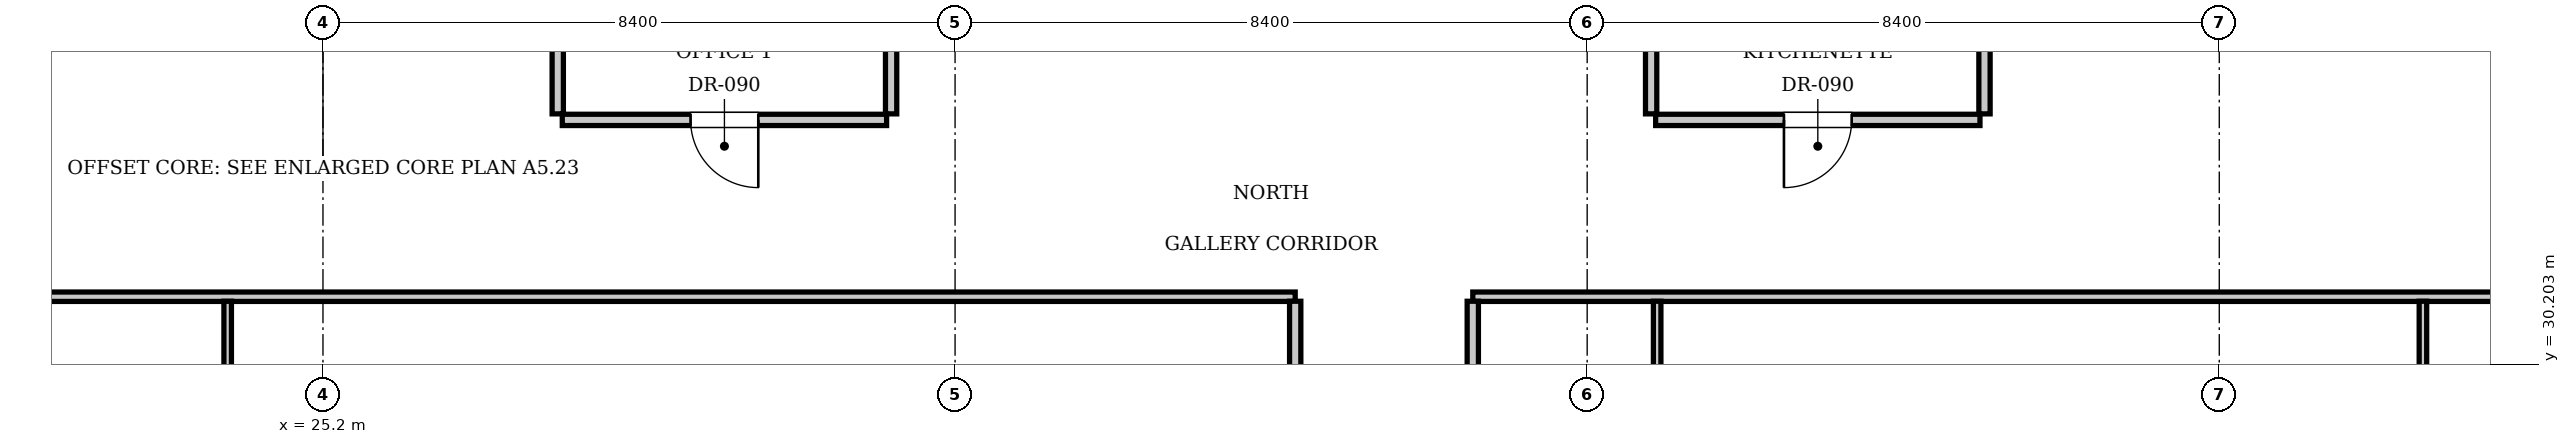
"""IFC4 building model, lengths in metres.
Left out: names, types, materials, properties, quantities, classifications, styles, units other than length and angle.
Written with IfcOpenShell. Run it as: python <this file> out.ifc"""

import sys

from ifc_helpers import new_model, si_unit, direction, frame, frame_2d, origin, place, context, subcontext, project, spatial, rectangle, extrude, element, fill, save


model = new_model("IFC4")
c1 = context("Model", 3, precision=1e-05, world=origin(), true_north=direction((0.0, 1.0)))
c2 = subcontext(c1, "Body", "Model", "MODEL_VIEW")
j1 = project(units=[si_unit("LENGTHUNIT", "METRE"), si_unit("PLANEANGLEUNIT", "RADIAN")], contexts=[c1])
p1 = place(None, origin())
s1 = spatial("IfcSite", under=j1, at=p1, CompositionType="ELEMENT")
p2 = place(p1, origin())
s2 = spatial("IfcBuilding", under=s1, at=p2, CompositionType="ELEMENT")
p3 = place(p2, frame((0.0, 0.0, 150.5)))
s3 = spatial("IfcBuildingStorey", under=s2, at=p3, CompositionType="ELEMENT", Elevation=150.5)
for number, where, z_axis, x_axis in (
    (1, (28.32, 33.53, 0.0), (0.0, 0.0, 1.0), (0.0, 1.0, 0.0)),
    (2, (32.75, 33.53, 0.0), (0.0, 0.0, 1.0), (0.0, 1.0, 0.0)),
):
    element("IfcWall", number, at=place(p3, frame(where, z_axis=z_axis, x_axis=x_axis)), inside=s3, PredefinedType="PARTITIONING", context=c2, shape_type="SweptSolid", body=[
        extrude(rectangle(XDim=2.59, YDim=0.15, at=frame_2d((1.295, 0.0))), origin(), (0.0, 0.0, 1.0), 3.61),
    ])
p4 = place(p3, frame((28.38, 33.45, 0.0), z_axis=(0.0, 0.0, 1.0), x_axis=(1.0, 0.0, 0.0)))
e3 = element("IfcWall", 3, at=p4, inside=s3, PredefinedType="PARTITIONING", context=c2, shape_type="SweptSolid", body=[
    extrude(rectangle(XDim=4.31, YDim=0.15, at=frame_2d((2.155, 0.0))), origin(), (0.0, 0.0, 1.0), 3.61),
])
p5 = place(p4, frame((1.705, 0.0, 0.0)))
e4 = element("IfcOpeningElement", 4, at=p5, cuts=e3, PredefinedType="OPENING", context=c2, shape_type="SweptSolid", body=[
    extrude(rectangle(XDim=0.9, YDim=2.1, at=frame_2d((0.45, 1.05))), frame((0.0, 0.085, 0.0), z_axis=(0.0, -1.0, 0.0), x_axis=(1.0, 0.0, 0.0)), (0.0, 0.0, 1.0), 0.17),
])
for number, where, z_axis, x_axis in (
    (5, (42.85, 33.53, 0.0), (0.0, 0.0, 1.0), (0.0, 1.0, 0.0)),
    (6, (47.28, 33.53, 0.0), (0.0, 0.0, 1.0), (0.0, 1.0, 0.0)),
):
    element("IfcWall", number, at=place(p3, frame(where, z_axis=z_axis, x_axis=x_axis)), inside=s3, PredefinedType="PARTITIONING", context=c2, shape_type="SweptSolid", body=[
        extrude(rectangle(XDim=2.59, YDim=0.15, at=frame_2d((1.295, 0.0))), origin(), (0.0, 0.0, 1.0), 3.61),
    ])
p6 = place(p3, frame((42.91, 33.45, 0.0), z_axis=(0.0, 0.0, 1.0), x_axis=(1.0, 0.0, 0.0)))
e7 = element("IfcWall", 7, at=p6, inside=s3, PredefinedType="PARTITIONING", context=c2, shape_type="SweptSolid", body=[
    extrude(rectangle(XDim=4.31, YDim=0.15, at=frame_2d((2.155, 0.0))), origin(), (0.0, 0.0, 1.0), 3.61),
])
p7 = place(p6, frame((1.705, 0.0, 0.0)))
e8 = element("IfcOpeningElement", 8, at=p7, cuts=e7, PredefinedType="OPENING", context=c2, shape_type="SweptSolid", body=[
    extrude(rectangle(XDim=0.9, YDim=2.1, at=frame_2d((0.45, 1.05))), frame((0.0, 0.085, 0.0), z_axis=(0.0, -1.0, 0.0), x_axis=(1.0, 0.0, 0.0)), (0.0, 0.0, 1.0), 0.17),
])
p8 = place(p3, frame((13.2, 31.1, 0.0), z_axis=(0.0, 0.0, 1.0), x_axis=(1.0, 0.0, 0.0)))
e9 = element("IfcWall", 9, at=p8, inside=s3, PredefinedType="PARTITIONING", context=c2, shape_type="SweptSolid", body=[
    extrude(rectangle(XDim=24.92, YDim=0.125, at=frame_2d((12.46, 0.0))), origin(), (0.0, 0.0, 1.0), 3.61),
])
p9 = place(p3, frame((40.48, 31.1, 0.0), z_axis=(0.0, 0.0, 1.0), x_axis=(1.0, 0.0, 0.0)))
e10 = element("IfcWall", 10, at=p9, inside=s3, PredefinedType="PARTITIONING", context=c2, shape_type="SweptSolid", body=[
    extrude(rectangle(XDim=21.92, YDim=0.125, at=frame_2d((10.96, 0.0))), origin(), (0.0, 0.0, 1.0), 3.61),
])
p10 = place(p3, frame((38.12, 27.56, 0.0), z_axis=(0.0, 0.0, 1.0), x_axis=(0.0, 1.0, 0.0)))
e11 = element("IfcWall", 11, at=p10, inside=s3, PredefinedType="PARTITIONING", context=c2, shape_type="SweptSolid", body=[
    extrude(rectangle(XDim=3.48, YDim=0.15, at=frame_2d((1.74, 0.0))), origin(), (0.0, 0.0, 1.0), 3.61),
])
p11 = place(p10, frame((1.265, 0.0, 0.0)))
e12 = element("IfcOpeningElement", 12, at=p11, cuts=e11, PredefinedType="OPENING", context=c2, shape_type="SweptSolid", body=[
    extrude(rectangle(XDim=0.95, YDim=2.15, at=frame_2d((0.475, 1.075))), frame((0.0, 0.085, 0.0), z_axis=(0.0, -1.0, 0.0), x_axis=(1.0, 0.0, 0.0)), (0.0, 0.0, 1.0), 0.17),
])
p12 = place(p3, frame((23.934, 25.63, 0.0), z_axis=(0.0, 0.0, 1.0), x_axis=(0.0, 1.0, 0.0)))
e13 = element("IfcWall", 13, at=p12, inside=s3, PredefinedType="PARTITIONING", context=c2, shape_type="SweptSolid", body=[
    extrude(rectangle(XDim=5.41, YDim=0.1, at=frame_2d((2.705, 0.0))), origin(), (0.0, 0.0, 1.0), 3.61),
])
p13 = place(p12, frame((2.735, 0.0, 0.0)))
e14 = element("IfcOpeningElement", 14, at=p13, cuts=e13, PredefinedType="OPENING", context=c2, shape_type="SweptSolid", body=[
    extrude(rectangle(XDim=0.9, YDim=2.1, at=frame_2d((0.45, 1.05))), frame((0.0, 0.06, 0.0), z_axis=(0.0, -1.0, 0.0), x_axis=(1.0, 0.0, 0.0)), (0.0, 0.0, 1.0), 0.12),
])
p14 = place(p3, frame((40.48, 29.11, 0.0), z_axis=(0.0, 0.0, 1.0), x_axis=(0.0, 1.0, 0.0)))
e15 = element("IfcWall", 15, at=p14, inside=s3, PredefinedType="PARTITIONING", context=c2, shape_type="SweptSolid", body=[
    extrude(rectangle(XDim=1.93, YDim=0.15, at=frame_2d((0.965, 0.0))), origin(), (0.0, 0.0, 1.0), 3.61),
])
p15 = place(p3, frame((42.93, 29.11, 0.0), z_axis=(0.0, 0.0, 1.0), x_axis=(0.0, 1.0, 0.0)))
e16 = element("IfcWall", 16, at=p15, inside=s3, PredefinedType="PARTITIONING", context=c2, shape_type="SweptSolid", body=[
    extrude(rectangle(XDim=1.93, YDim=0.1, at=frame_2d((0.965, 0.0))), origin(), (0.0, 0.0, 1.0), 3.61),
])
p16 = place(p3, frame((53.106, 25.63, 0.0), z_axis=(0.0, 0.0, 1.0), x_axis=(0.0, 1.0, 0.0)))
e17 = element("IfcWall", 17, at=p16, inside=s3, PredefinedType="PARTITIONING", context=c2, shape_type="SweptSolid", body=[
    extrude(rectangle(XDim=5.41, YDim=0.1, at=frame_2d((2.705, 0.0))), origin(), (0.0, 0.0, 1.0), 3.61),
])
p17 = place(p16, frame((2.255, 0.0, 0.0)))
e18 = element("IfcOpeningElement", 18, at=p17, cuts=e17, PredefinedType="OPENING", context=c2, shape_type="SweptSolid", body=[
    extrude(rectangle(XDim=0.9, YDim=2.1, at=frame_2d((0.45, 1.05))), frame((0.0, 0.06, 0.0), z_axis=(0.0, -1.0, 0.0), x_axis=(1.0, 0.0, 0.0)), (0.0, 0.0, 1.0), 0.12),
])
p18 = place(p5, frame((0.9, 0.0, 0.0), z_axis=(0.0, 0.0, 1.0), x_axis=(-1.0, 0.0, 0.0)))
e19 = element("IfcDoor", 19, at=p18, inside=s3, OperationType="SINGLE_SWING_LEFT", PredefinedType="DOOR", context=c2, shape_type="SweptSolid", body=[
    extrude(rectangle(XDim=0.9, YDim=2.1, at=frame_2d((0.45, 1.05))), frame((0.0, 0.025, 0.0), z_axis=(0.0, -1.0, 0.0), x_axis=(1.0, 0.0, 0.0)), (0.0, 0.0, 1.0), 0.05),
])
fill(e4, e19)
p19 = place(p7, frame((0.9, 0.0, 0.0), z_axis=(0.0, 0.0, 1.0), x_axis=(-1.0, 0.0, 0.0)))
e20 = element("IfcDoor", 20, at=p19, inside=s3, OperationType="SINGLE_SWING_RIGHT", PredefinedType="DOOR", context=c2, shape_type="SweptSolid", body=[
    extrude(rectangle(XDim=0.9, YDim=2.1, at=frame_2d((0.45, 1.05))), frame((0.0, 0.025, 0.0), z_axis=(0.0, -1.0, 0.0), x_axis=(1.0, 0.0, 0.0)), (0.0, 0.0, 1.0), 0.05),
])
fill(e8, e20)
save(model, sys.argv[1])
